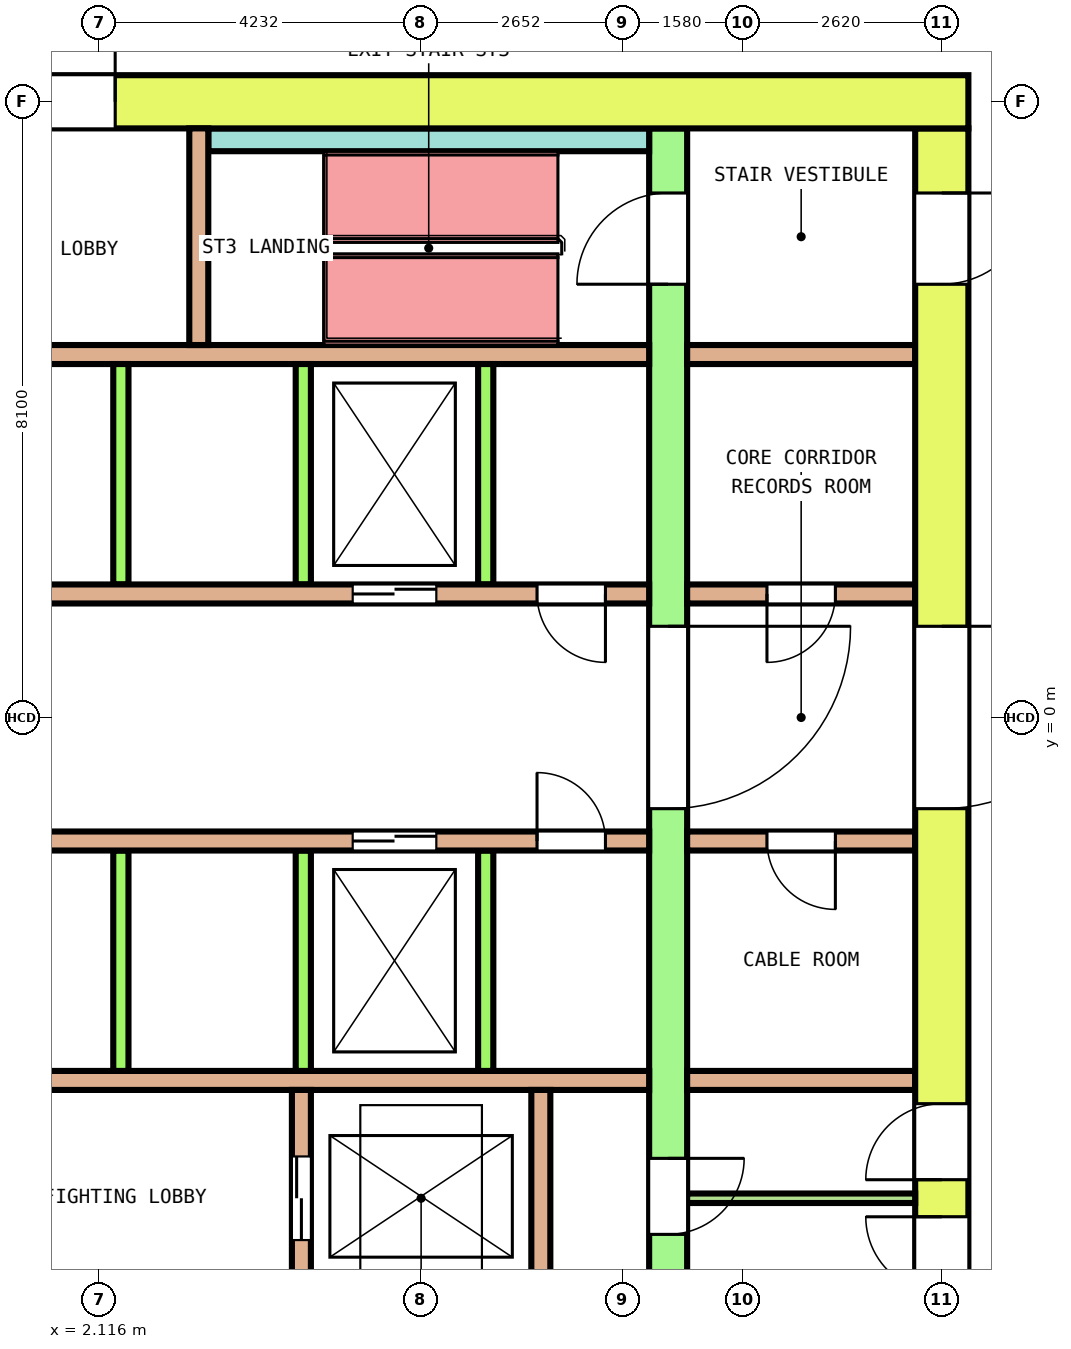
"""IFC4 building model, lengths in metres.
Left out: names, types, materials, properties, quantities, classifications, styles, units other than length and angle.
Written with IfcOpenShell. Run it as: python <this file> out.ifc"""

import sys

from ifc_helpers import new_model, si_unit, direction, frame, frame_2d, origin, place, context, subcontext, project, spatial, rectangle, extrude, element, fill, save


model = new_model("IFC4")
c1 = context("Model", 3, precision=1e-05, world=origin(), true_north=direction((0.0, 1.0)))
c2 = subcontext(c1, "Body", "Model", "MODEL_VIEW")
j1 = project(units=[si_unit("LENGTHUNIT", "METRE"), si_unit("PLANEANGLEUNIT", "RADIAN")], contexts=[c1])
p1 = place(None, origin())
s1 = spatial("IfcSite", under=j1, at=p1, CompositionType="ELEMENT")
p2 = place(p1, origin())
s2 = spatial("IfcBuilding", under=s1, at=p2, CompositionType="ELEMENT")
p3 = place(p2, frame((0.0, 0.0, 154.0)))
s3 = spatial("IfcBuildingStorey", under=s2, at=p3, CompositionType="ELEMENT", Elevation=154.0)
p4 = place(p3, frame((-13.55, 8.1, 0.0), z_axis=(0.0, 0.0, 1.0), x_axis=(1.0, 0.0, 0.0)))
e1 = element("IfcWall", 1, at=p4, inside=s3, PredefinedType="SHEAR", context=c2, shape_type="SweptSolid", body=[
    extrude(rectangle(XDim=27.1, YDim=0.7, at=frame_2d((13.55, 0.0))), origin(), (0.0, 0.0, 1.0), 4.1),
])
p5 = place(p4, frame((14.475, 0.0, 0.0)))
e2 = element("IfcOpeningElement", 2, at=p5, cuts=e1, PredefinedType="OPENING", context=c2, shape_type="SweptSolid", body=[
    extrude(rectangle(XDim=1.4, YDim=2.1, at=frame_2d((0.7, 1.05))), frame((0.0, 0.36, 0.0), z_axis=(0.0, -1.0, 0.0), x_axis=(1.0, 0.0, 0.0)), (0.0, 0.0, 1.0), 0.72),
])
p6 = place(p3, frame((13.2, -7.75, 0.0), z_axis=(0.0, 0.0, 1.0), x_axis=(0.0, 1.0, 0.0)))
e3 = element("IfcWall", 3, at=p6, inside=s3, PredefinedType="SHEAR", context=c2, shape_type="SweptSolid", body=[
    extrude(rectangle(XDim=15.5, YDim=0.7, at=frame_2d((7.75, 0.0))), origin(), (0.0, 0.0, 1.0), 4.1),
])
p7 = place(p6, frame((6.55, 0.0, 0.0)))
e4 = element("IfcOpeningElement", 4, at=p7, cuts=e3, PredefinedType="OPENING", context=c2, shape_type="SweptSolid", body=[
    extrude(rectangle(XDim=2.4, YDim=2.1, at=frame_2d((1.2, 1.05))), frame((0.0, 0.36, 0.0), z_axis=(0.0, -1.0, 0.0), x_axis=(1.0, 0.0, 0.0)), (0.0, 0.0, 1.0), 0.72),
])
p8 = place(p6, frame((13.45, 0.0, 0.0)))
e5 = element("IfcOpeningElement", 5, at=p8, cuts=e3, PredefinedType="OPENING", context=c2, shape_type="SweptSolid", body=[
    extrude(rectangle(XDim=1.2, YDim=2.1, at=frame_2d((0.6, 1.05))), frame((0.0, 0.36, 0.0), z_axis=(0.0, -1.0, 0.0), x_axis=(1.0, 0.0, 0.0)), (0.0, 0.0, 1.0), 0.72),
])
p9 = place(p6, frame((0.181, 0.0, 0.0)))
e6 = element("IfcOpeningElement", 6, at=p9, cuts=e3, PredefinedType="OPENING", context=c2, shape_type="SweptSolid", body=[
    extrude(rectangle(XDim=1.0, YDim=2.1, at=frame_2d((0.5, 1.05))), frame((0.0, 0.36, 0.0), z_axis=(0.0, -1.0, 0.0), x_axis=(1.0, 0.0, 0.0)), (0.0, 0.0, 1.0), 0.72),
])
p10 = place(p6, frame((1.669, 0.0, 0.0)))
e7 = element("IfcOpeningElement", 7, at=p10, cuts=e3, PredefinedType="OPENING", context=c2, shape_type="SweptSolid", body=[
    extrude(rectangle(XDim=1.0, YDim=2.1, at=frame_2d((0.5, 1.05))), frame((0.0, 0.36, 0.0), z_axis=(0.0, -1.0, 0.0), x_axis=(1.0, 0.0, 0.0)), (0.0, 0.0, 1.0), 0.72),
])
p11 = place(p3, frame((9.6, -7.75, 0.0), z_axis=(0.0, 0.0, 1.0), x_axis=(0.0, 1.0, 0.0)))
e8 = element("IfcWall", 8, at=p11, inside=s3, PredefinedType="SHEAR", context=c2, shape_type="SweptSolid", body=[
    extrude(rectangle(XDim=15.5, YDim=0.5, at=frame_2d((7.75, 0.0))), origin(), (0.0, 0.0, 1.0), 4.1),
])
p12 = place(p11, frame((6.55, 0.0, 0.0)))
e9 = element("IfcOpeningElement", 9, at=p12, cuts=e8, PredefinedType="OPENING", context=c2, shape_type="SweptSolid", body=[
    extrude(rectangle(XDim=2.4, YDim=2.1, at=frame_2d((1.2, 1.05))), frame((0.0, 0.26, 0.0), z_axis=(0.0, -1.0, 0.0), x_axis=(1.0, 0.0, 0.0)), (0.0, 0.0, 1.0), 0.52),
])
p13 = place(p11, frame((13.45, 0.0, 0.0)))
e10 = element("IfcOpeningElement", 10, at=p13, cuts=e8, PredefinedType="OPENING", context=c2, shape_type="SweptSolid", body=[
    extrude(rectangle(XDim=1.2, YDim=2.1, at=frame_2d((0.6, 1.05))), frame((0.0, 0.26, 0.0), z_axis=(0.0, -1.0, 0.0), x_axis=(1.0, 0.0, 0.0)), (0.0, 0.0, 1.0), 0.52),
])
p14 = place(p11, frame((0.95, 0.0, 0.0)))
e11 = element("IfcOpeningElement", 11, at=p14, cuts=e8, PredefinedType="OPENING", context=c2, shape_type="SweptSolid", body=[
    extrude(rectangle(XDim=1.0, YDim=2.1, at=frame_2d((0.5, 1.05))), frame((0.0, 0.26, 0.0), z_axis=(0.0, -1.0, 0.0), x_axis=(1.0, 0.0, 0.0)), (0.0, 0.0, 1.0), 0.52),
])
p15 = place(p3, frame((-9.35, 1.625, 0.0), z_axis=(0.0, 0.0, 1.0), x_axis=(1.0, 0.0, 0.0)))
e12 = element("IfcWall", 12, at=p15, inside=s3, PredefinedType="SOLIDWALL", context=c2, shape_type="SweptSolid", body=[
    extrude(rectangle(XDim=18.7, YDim=0.25, at=frame_2d((9.35, 0.0))), origin(), (0.0, 0.0, 1.0), 4.1),
])
p16 = place(p15, frame((2.85, 0.0, 0.0)))
e13 = element("IfcOpeningElement", 13, at=p16, cuts=e12, PredefinedType="OPENING", context=c2, shape_type="SweptSolid", body=[
    extrude(rectangle(XDim=1.1, YDim=2.1, at=frame_2d((0.55, 1.05))), frame((0.0, 0.135, 0.0), z_axis=(0.0, -1.0, 0.0), x_axis=(1.0, 0.0, 0.0)), (0.0, 0.0, 1.0), 0.27),
])
p17 = place(p15, frame((5.15, 0.0, 0.0)))
e14 = element("IfcOpeningElement", 14, at=p17, cuts=e12, PredefinedType="OPENING", context=c2, shape_type="SweptSolid", body=[
    extrude(rectangle(XDim=1.1, YDim=2.1, at=frame_2d((0.55, 1.05))), frame((0.0, 0.135, 0.0), z_axis=(0.0, -1.0, 0.0), x_axis=(1.0, 0.0, 0.0)), (0.0, 0.0, 1.0), 0.27),
])
p18 = place(p15, frame((14.8, 0.0, 0.0)))
e15 = element("IfcOpeningElement", 15, at=p18, cuts=e12, PredefinedType="OPENING", context=c2, shape_type="SweptSolid", body=[
    extrude(rectangle(XDim=1.1, YDim=2.1, at=frame_2d((0.55, 1.05))), frame((0.0, 0.135, 0.0), z_axis=(0.0, -1.0, 0.0), x_axis=(1.0, 0.0, 0.0)), (0.0, 0.0, 1.0), 0.27),
])
p19 = place(p15, frame((0.575, 0.0, 0.0)))
e16 = element("IfcOpeningElement", 16, at=p19, cuts=e12, PredefinedType="OPENING", context=c2, shape_type="SweptSolid", body=[
    extrude(rectangle(XDim=0.9, YDim=2.1, at=frame_2d((0.45, 1.05))), frame((0.0, 0.135, 0.0), z_axis=(0.0, -1.0, 0.0), x_axis=(1.0, 0.0, 0.0)), (0.0, 0.0, 1.0), 0.27),
])
p20 = place(p15, frame((17.225, 0.0, 0.0)))
e17 = element("IfcOpeningElement", 17, at=p20, cuts=e12, PredefinedType="OPENING", context=c2, shape_type="SweptSolid", body=[
    extrude(rectangle(XDim=0.9, YDim=2.1, at=frame_2d((0.45, 1.05))), frame((0.0, 0.135, 0.0), z_axis=(0.0, -1.0, 0.0), x_axis=(1.0, 0.0, 0.0)), (0.0, 0.0, 1.0), 0.27),
])
p21 = place(p3, frame((9.85, 1.625, 0.0), z_axis=(0.0, 0.0, 1.0), x_axis=(1.0, 0.0, 0.0)))
e18 = element("IfcWall", 18, at=p21, inside=s3, PredefinedType="SOLIDWALL", context=c2, shape_type="SweptSolid", body=[
    extrude(rectangle(XDim=3.0, YDim=0.25, at=frame_2d((1.5, 0.0))), origin(), (0.0, 0.0, 1.0), 4.1),
])
p22 = place(p21, frame((1.05, 0.0, 0.0)))
e19 = element("IfcOpeningElement", 19, at=p22, cuts=e18, PredefinedType="OPENING", context=c2, shape_type="SweptSolid", body=[
    extrude(rectangle(XDim=0.9, YDim=2.1, at=frame_2d((0.45, 1.05))), frame((0.0, 0.135, 0.0), z_axis=(0.0, -1.0, 0.0), x_axis=(1.0, 0.0, 0.0)), (0.0, 0.0, 1.0), 0.27),
])
p23 = place(p3, frame((-9.35, 4.775, 0.0), z_axis=(0.0, 0.0, 1.0), x_axis=(1.0, 0.0, 0.0)))
e20 = element("IfcWall", 20, at=p23, inside=s3, PredefinedType="SOLIDWALL", context=c2, shape_type="SweptSolid", body=[
    extrude(rectangle(XDim=18.7, YDim=0.25, at=frame_2d((9.35, 0.0))), origin(), (0.0, 0.0, 1.0), 4.1),
])
p24 = place(p3, frame((9.85, 4.775, 0.0), z_axis=(0.0, 0.0, 1.0), x_axis=(1.0, 0.0, 0.0)))
e21 = element("IfcWall", 21, at=p24, inside=s3, PredefinedType="SOLIDWALL", context=c2, shape_type="SweptSolid", body=[
    extrude(rectangle(XDim=3.0, YDim=0.25, at=frame_2d((1.5, 0.0))), origin(), (0.0, 0.0, 1.0), 4.1),
])
for number, where, z_axis, x_axis in (
    (22, (2.4, 1.75, 0.0), (0.0, 0.0, 1.0), (0.0, 1.0, 0.0)),
    (23, (4.8, 1.75, 0.0), (0.0, 0.0, 1.0), (0.0, 1.0, 0.0)),
    (24, (7.2, 1.75, 0.0), (0.0, 0.0, 1.0), (0.0, 1.0, 0.0)),
):
    element("IfcWall", number, at=place(p3, frame(where, z_axis=z_axis, x_axis=x_axis)), inside=s3, PredefinedType="SOLIDWALL", context=c2, shape_type="SweptSolid", body=[
        extrude(rectangle(XDim=2.9, YDim=0.2, at=frame_2d((1.45, 0.0))), origin(), (0.0, 0.0, 1.0), 4.1),
    ])
p25 = place(p3, frame((-9.35, -1.625, 0.0), z_axis=(0.0, 0.0, 1.0), x_axis=(1.0, 0.0, 0.0)))
e25 = element("IfcWall", 25, at=p25, inside=s3, PredefinedType="SOLIDWALL", context=c2, shape_type="SweptSolid", body=[
    extrude(rectangle(XDim=18.7, YDim=0.25, at=frame_2d((9.35, 0.0))), origin(), (0.0, 0.0, 1.0), 4.1),
])
p26 = place(p25, frame((2.85, 0.0, 0.0)))
e26 = element("IfcOpeningElement", 26, at=p26, cuts=e25, PredefinedType="OPENING", context=c2, shape_type="SweptSolid", body=[
    extrude(rectangle(XDim=1.1, YDim=2.1, at=frame_2d((0.55, 1.05))), frame((0.0, 0.135, 0.0), z_axis=(0.0, -1.0, 0.0), x_axis=(1.0, 0.0, 0.0)), (0.0, 0.0, 1.0), 0.27),
])
p27 = place(p25, frame((5.15, 0.0, 0.0)))
e27 = element("IfcOpeningElement", 27, at=p27, cuts=e25, PredefinedType="OPENING", context=c2, shape_type="SweptSolid", body=[
    extrude(rectangle(XDim=1.1, YDim=2.1, at=frame_2d((0.55, 1.05))), frame((0.0, 0.135, 0.0), z_axis=(0.0, -1.0, 0.0), x_axis=(1.0, 0.0, 0.0)), (0.0, 0.0, 1.0), 0.27),
])
p28 = place(p25, frame((14.8, 0.0, 0.0)))
e28 = element("IfcOpeningElement", 28, at=p28, cuts=e25, PredefinedType="OPENING", context=c2, shape_type="SweptSolid", body=[
    extrude(rectangle(XDim=1.1, YDim=2.1, at=frame_2d((0.55, 1.05))), frame((0.0, 0.135, 0.0), z_axis=(0.0, -1.0, 0.0), x_axis=(1.0, 0.0, 0.0)), (0.0, 0.0, 1.0), 0.27),
])
p29 = place(p25, frame((0.575, 0.0, 0.0)))
e29 = element("IfcOpeningElement", 29, at=p29, cuts=e25, PredefinedType="OPENING", context=c2, shape_type="SweptSolid", body=[
    extrude(rectangle(XDim=0.9, YDim=2.1, at=frame_2d((0.45, 1.05))), frame((0.0, 0.135, 0.0), z_axis=(0.0, -1.0, 0.0), x_axis=(1.0, 0.0, 0.0)), (0.0, 0.0, 1.0), 0.27),
])
p30 = place(p25, frame((17.225, 0.0, 0.0)))
e30 = element("IfcOpeningElement", 30, at=p30, cuts=e25, PredefinedType="OPENING", context=c2, shape_type="SweptSolid", body=[
    extrude(rectangle(XDim=0.9, YDim=2.1, at=frame_2d((0.45, 1.05))), frame((0.0, 0.135, 0.0), z_axis=(0.0, -1.0, 0.0), x_axis=(1.0, 0.0, 0.0)), (0.0, 0.0, 1.0), 0.27),
])
p31 = place(p3, frame((9.85, -1.625, 0.0), z_axis=(0.0, 0.0, 1.0), x_axis=(1.0, 0.0, 0.0)))
e31 = element("IfcWall", 31, at=p31, inside=s3, PredefinedType="SOLIDWALL", context=c2, shape_type="SweptSolid", body=[
    extrude(rectangle(XDim=3.0, YDim=0.25, at=frame_2d((1.5, 0.0))), origin(), (0.0, 0.0, 1.0), 4.1),
])
p32 = place(p31, frame((1.05, 0.0, 0.0)))
e32 = element("IfcOpeningElement", 32, at=p32, cuts=e31, PredefinedType="OPENING", context=c2, shape_type="SweptSolid", body=[
    extrude(rectangle(XDim=0.9, YDim=2.1, at=frame_2d((0.45, 1.05))), frame((0.0, 0.135, 0.0), z_axis=(0.0, -1.0, 0.0), x_axis=(1.0, 0.0, 0.0)), (0.0, 0.0, 1.0), 0.27),
])
p33 = place(p3, frame((-9.35, -4.775, 0.0), z_axis=(0.0, 0.0, 1.0), x_axis=(1.0, 0.0, 0.0)))
e33 = element("IfcWall", 33, at=p33, inside=s3, PredefinedType="SOLIDWALL", context=c2, shape_type="SweptSolid", body=[
    extrude(rectangle(XDim=18.7, YDim=0.25, at=frame_2d((9.35, 0.0))), origin(), (0.0, 0.0, 1.0), 4.1),
])
p34 = place(p3, frame((9.85, -4.775, 0.0), z_axis=(0.0, 0.0, 1.0), x_axis=(1.0, 0.0, 0.0)))
e34 = element("IfcWall", 34, at=p34, inside=s3, PredefinedType="SOLIDWALL", context=c2, shape_type="SweptSolid", body=[
    extrude(rectangle(XDim=3.0, YDim=0.25, at=frame_2d((1.5, 0.0))), origin(), (0.0, 0.0, 1.0), 4.1),
])
for number, where, z_axis, x_axis in (
    (35, (2.4, -4.65, 0.0), (0.0, 0.0, 1.0), (0.0, 1.0, 0.0)),
    (36, (4.8, -4.65, 0.0), (0.0, 0.0, 1.0), (0.0, 1.0, 0.0)),
    (37, (7.2, -4.65, 0.0), (0.0, 0.0, 1.0), (0.0, 1.0, 0.0)),
):
    element("IfcWall", number, at=place(p3, frame(where, z_axis=z_axis, x_axis=x_axis)), inside=s3, PredefinedType="SOLIDWALL", context=c2, shape_type="SweptSolid", body=[
        extrude(rectangle(XDim=2.9, YDim=0.2, at=frame_2d((1.45, 0.0))), origin(), (0.0, 0.0, 1.0), 4.1),
    ])
p35 = place(p3, frame((3.55, 7.6, 0.0), z_axis=(0.0, 0.0, 1.0), x_axis=(1.0, 0.0, 0.0)))
e38 = element("IfcWall", 38, at=p35, inside=s3, PredefinedType="SOLIDWALL", context=c2, shape_type="SweptSolid", body=[
    extrude(rectangle(XDim=5.8, YDim=0.3, at=frame_2d((2.9, 0.0))), origin(), (0.0, 0.0, 1.0), 4.1),
])
p36 = place(p3, frame((3.425, 4.9, 0.0), z_axis=(0.0, 0.0, 1.0), x_axis=(0.0, 1.0, 0.0)))
e39 = element("IfcWall", 39, at=p36, inside=s3, PredefinedType="SOLIDWALL", context=c2, shape_type="SweptSolid", body=[
    extrude(rectangle(XDim=2.85, YDim=0.25, at=frame_2d((1.425, 0.0))), origin(), (0.0, 0.0, 1.0), 4.1),
])
p37 = place(p3, frame((4.775, -7.75, 0.0), z_axis=(0.0, 0.0, 1.0), x_axis=(0.0, 1.0, 0.0)))
e40 = element("IfcWall", 40, at=p37, inside=s3, PredefinedType="SOLIDWALL", context=c2, shape_type="SweptSolid", body=[
    extrude(rectangle(XDim=2.85, YDim=0.25, at=frame_2d((1.425, 0.0))), origin(), (0.0, 0.0, 1.0), 4.1),
])
p38 = place(p37, frame((0.875, 0.0, 0.0)))
e41 = element("IfcOpeningElement", 41, at=p38, cuts=e40, PredefinedType="OPENING", context=c2, shape_type="SweptSolid", body=[
    extrude(rectangle(XDim=1.1, YDim=2.1, at=frame_2d((0.55, 1.05))), frame((0.0, 0.135, 0.0), z_axis=(0.0, -1.0, 0.0), x_axis=(1.0, 0.0, 0.0)), (0.0, 0.0, 1.0), 0.27),
])
p39 = place(p3, frame((7.925, -7.75, 0.0), z_axis=(0.0, 0.0, 1.0), x_axis=(0.0, 1.0, 0.0)))
e42 = element("IfcWall", 42, at=p39, inside=s3, PredefinedType="SOLIDWALL", context=c2, shape_type="SweptSolid", body=[
    extrude(rectangle(XDim=2.85, YDim=0.25, at=frame_2d((1.425, 0.0))), origin(), (0.0, 0.0, 1.0), 4.1),
])
p40 = place(p3, frame((9.85, -6.325, 0.0), z_axis=(0.0, 0.0, 1.0), x_axis=(1.0, 0.0, 0.0)))
e43 = element("IfcWall", 43, at=p40, inside=s3, PredefinedType="PARTITIONING", context=c2, shape_type="SweptSolid", body=[
    extrude(rectangle(XDim=3.0, YDim=0.125, at=frame_2d((1.5, 0.0))), origin(), (0.0, 0.0, 1.0), 4.1),
])
p41 = place(p18, origin())
e44 = element("IfcDoor", 44, at=p41, inside=s3, OperationType="DOUBLE_DOOR_SLIDING", PredefinedType="DOOR", context=c2, shape_type="SweptSolid", body=[
    extrude(rectangle(XDim=1.1, YDim=2.1, at=frame_2d((0.55, 1.05))), frame((0.0, 0.075, 0.0), z_axis=(0.0, -1.0, 0.0), x_axis=(1.0, 0.0, 0.0)), (0.0, 0.0, 1.0), 0.15),
])
fill(e15, e44)
p42 = place(p28, origin())
e45 = element("IfcDoor", 45, at=p42, inside=s3, OperationType="DOUBLE_DOOR_SLIDING", PredefinedType="DOOR", context=c2, shape_type="SweptSolid", body=[
    extrude(rectangle(XDim=1.1, YDim=2.1, at=frame_2d((0.55, 1.05))), frame((0.0, 0.075, 0.0), z_axis=(0.0, -1.0, 0.0), x_axis=(1.0, 0.0, 0.0)), (0.0, 0.0, 1.0), 0.15),
])
fill(e28, e45)
p43 = place(p38, origin())
e46 = element("IfcDoor", 46, at=p43, inside=s3, OperationType="DOUBLE_DOOR_SLIDING", PredefinedType="DOOR", context=c2, shape_type="SweptSolid", body=[
    extrude(rectangle(XDim=1.1, YDim=2.1, at=frame_2d((0.55, 1.05))), frame((0.0, 0.075, 0.0), z_axis=(0.0, -1.0, 0.0), x_axis=(1.0, 0.0, 0.0)), (0.0, 0.0, 1.0), 0.15),
])
fill(e41, e46)
p44 = place(p12, origin())
e47 = element("IfcDoor", 47, at=p44, inside=s3, OperationType="DOUBLE_DOOR_SINGLE_SWING", PredefinedType="DOOR", context=c2, shape_type="SweptSolid", body=[
    extrude(rectangle(XDim=2.4, YDim=2.1, at=frame_2d((1.2, 1.05))), frame((0.0, 0.2, 0.0), z_axis=(0.0, -1.0, 0.0), x_axis=(1.0, 0.0, 0.0)), (0.0, 0.0, 1.0), 0.4),
])
fill(e9, e47)
p45 = place(p7, origin())
e48 = element("IfcDoor", 48, at=p45, inside=s3, OperationType="DOUBLE_DOOR_SINGLE_SWING", PredefinedType="DOOR", context=c2, shape_type="SweptSolid", body=[
    extrude(rectangle(XDim=2.4, YDim=2.1, at=frame_2d((1.2, 1.05))), frame((0.0, 0.3, 0.0), z_axis=(0.0, -1.0, 0.0), x_axis=(1.0, 0.0, 0.0)), (0.0, 0.0, 1.0), 0.6),
])
fill(e4, e48)
p46 = place(p13, origin())
e49 = element("IfcDoor", 49, at=p46, inside=s3, OperationType="SINGLE_SWING_RIGHT", PredefinedType="DOOR", context=c2, shape_type="SweptSolid", body=[
    extrude(rectangle(XDim=1.2, YDim=2.1, at=frame_2d((0.6, 1.05))), frame((0.0, 0.2, 0.0), z_axis=(0.0, -1.0, 0.0), x_axis=(1.0, 0.0, 0.0)), (0.0, 0.0, 1.0), 0.4),
])
fill(e10, e49)
p47 = place(p8, origin())
e50 = element("IfcDoor", 50, at=p47, inside=s3, OperationType="SINGLE_SWING_LEFT", PredefinedType="DOOR", context=c2, shape_type="SweptSolid", body=[
    extrude(rectangle(XDim=1.2, YDim=2.1, at=frame_2d((0.6, 1.05))), frame((0.0, 0.3, 0.0), z_axis=(0.0, -1.0, 0.0), x_axis=(1.0, 0.0, 0.0)), (0.0, 0.0, 1.0), 0.6),
])
fill(e5, e50)
p48 = place(p5, origin())
e51 = element("IfcDoor", 51, at=p48, inside=s3, OperationType="DOUBLE_DOOR_SINGLE_SWING", PredefinedType="DOOR", context=c2, shape_type="SweptSolid", body=[
    extrude(rectangle(XDim=1.4, YDim=2.1, at=frame_2d((0.7, 1.05))), frame((0.0, 0.3, 0.0), z_axis=(0.0, -1.0, 0.0), x_axis=(1.0, 0.0, 0.0)), (0.0, 0.0, 1.0), 0.6),
])
fill(e2, e51)
p49 = place(p14, origin())
e52 = element("IfcDoor", 52, at=p49, inside=s3, OperationType="SINGLE_SWING_RIGHT", PredefinedType="DOOR", context=c2, shape_type="SweptSolid", body=[
    extrude(rectangle(XDim=1.0, YDim=2.1, at=frame_2d((0.5, 1.05))), frame((0.0, 0.2, 0.0), z_axis=(0.0, -1.0, 0.0), x_axis=(1.0, 0.0, 0.0)), (0.0, 0.0, 1.0), 0.4),
])
fill(e11, e52)
p50 = place(p9, origin())
e53 = element("IfcDoor", 53, at=p50, inside=s3, OperationType="SINGLE_SWING_LEFT", PredefinedType="DOOR", context=c2, shape_type="SweptSolid", body=[
    extrude(rectangle(XDim=1.0, YDim=2.1, at=frame_2d((0.5, 1.05))), frame((0.0, 0.3, 0.0), z_axis=(0.0, -1.0, 0.0), x_axis=(1.0, 0.0, 0.0)), (0.0, 0.0, 1.0), 0.6),
])
fill(e6, e53)
p51 = place(p10, origin())
e54 = element("IfcDoor", 54, at=p51, inside=s3, OperationType="SINGLE_SWING_RIGHT", PredefinedType="DOOR", context=c2, shape_type="SweptSolid", body=[
    extrude(rectangle(XDim=1.0, YDim=2.1, at=frame_2d((0.5, 1.05))), frame((0.0, 0.3, 0.0), z_axis=(0.0, -1.0, 0.0), x_axis=(1.0, 0.0, 0.0)), (0.0, 0.0, 1.0), 0.6),
])
fill(e7, e54)
p52 = place(p20, origin())
e55 = element("IfcDoor", 55, at=p52, inside=s3, OperationType="SINGLE_SWING_RIGHT", PredefinedType="DOOR", context=c2, shape_type="SweptSolid", body=[
    extrude(rectangle(XDim=0.9, YDim=2.1, at=frame_2d((0.45, 1.05))), frame((0.0, 0.075, 0.0), z_axis=(0.0, -1.0, 0.0), x_axis=(1.0, 0.0, 0.0)), (0.0, 0.0, 1.0), 0.15),
])
fill(e17, e55)
p53 = place(p22, origin())
e56 = element("IfcDoor", 56, at=p53, inside=s3, OperationType="SINGLE_SWING_LEFT", PredefinedType="DOOR", context=c2, shape_type="SweptSolid", body=[
    extrude(rectangle(XDim=0.9, YDim=2.1, at=frame_2d((0.45, 1.05))), frame((0.0, 0.075, 0.0), z_axis=(0.0, -1.0, 0.0), x_axis=(1.0, 0.0, 0.0)), (0.0, 0.0, 1.0), 0.15),
])
fill(e19, e56)
p54 = place(p30, origin())
e57 = element("IfcDoor", 57, at=p54, inside=s3, OperationType="SINGLE_SWING_LEFT", PredefinedType="DOOR", context=c2, shape_type="SweptSolid", body=[
    extrude(rectangle(XDim=0.9, YDim=2.1, at=frame_2d((0.45, 1.05))), frame((0.0, 0.075, 0.0), z_axis=(0.0, -1.0, 0.0), x_axis=(1.0, 0.0, 0.0)), (0.0, 0.0, 1.0), 0.15),
])
fill(e30, e57)
p55 = place(p32, origin())
e58 = element("IfcDoor", 58, at=p55, inside=s3, OperationType="SINGLE_SWING_RIGHT", PredefinedType="DOOR", context=c2, shape_type="SweptSolid", body=[
    extrude(rectangle(XDim=0.9, YDim=2.1, at=frame_2d((0.45, 1.05))), frame((0.0, 0.075, 0.0), z_axis=(0.0, -1.0, 0.0), x_axis=(1.0, 0.0, 0.0)), (0.0, 0.0, 1.0), 0.15),
])
fill(e32, e58)
save(model, sys.argv[1])
